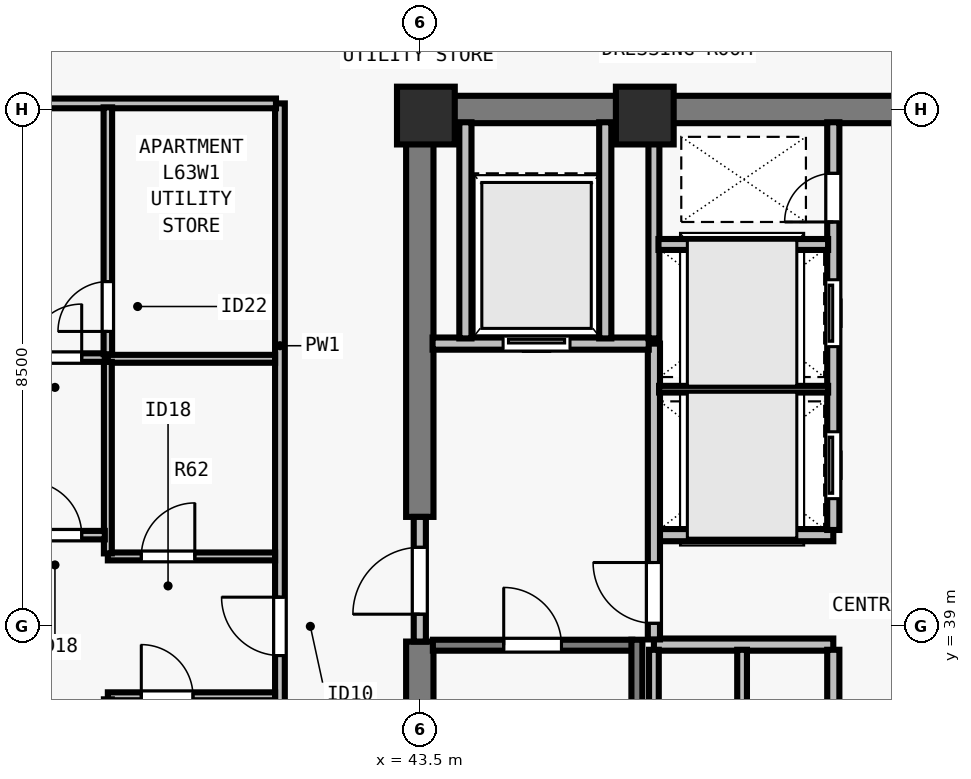
"""IFC4 building model, lengths in metres.
Left out: names, types, materials, properties, quantities, classifications, styles, units other than length and angle.
Written with IfcOpenShell. Run it as: python <this file> out.ifc"""

import sys

from ifc_helpers import new_model, si_unit, direction, frame, frame_2d, origin, origin_2d, place, context, subcontext, project, spatial, rectangle, extrude, element, fill, save


model = new_model("IFC4")
c1 = context("Model", 3, precision=1e-05, world=origin(), true_north=direction((0.0, 1.0)))
c2 = subcontext(c1, "Body", "Model", "MODEL_VIEW")
j1 = project(units=[si_unit("LENGTHUNIT", "METRE"), si_unit("PLANEANGLEUNIT", "RADIAN")], contexts=[c1])
p1 = place(None, origin())
s1 = spatial("IfcSite", under=j1, at=p1, CompositionType="ELEMENT")
p2 = place(p1, origin())
s2 = spatial("IfcBuilding", under=s1, at=p2, CompositionType="ELEMENT")
p3 = place(p2, frame((0.0, 0.0, 230.5)))
s3 = spatial("IfcBuildingStorey", under=s2, at=p3, CompositionType="ELEMENT", Elevation=230.5)
for number, where, z_axis, x_axis in (
    (1, (43.6, 47.4, 0.0), (0.0, 0.0, 1.0), (1.0, 0.0, 0.0)),
    (2, (47.2, 47.4, 0.0), (0.0, 0.0, 1.0), (1.0, 0.0, 0.0)),
):
    element("IfcColumn", number, at=place(p3, frame(where, z_axis=z_axis, x_axis=x_axis)), inside=s3, PredefinedType="COLUMN", context=c2, shape_type="SweptSolid", body=[
        extrude(rectangle(XDim=0.95, YDim=0.95, at=origin_2d()), origin(), (0.0, 0.0, 1.0), 3.5),
    ])
p4 = place(p3, frame((43.275, 47.5, 0.0), z_axis=(0.0, 0.0, 1.0), x_axis=(1.0, 0.0, 0.0)))
e3 = element("IfcWall", 3, at=p4, inside=s3, PredefinedType="SHEAR", context=c2, shape_type="SweptSolid", body=[
    extrude(rectangle(XDim=17.45, YDim=0.45, at=frame_2d((8.725, 0.0))), origin(), (0.0, 0.0, 1.0), 3.29),
])
p5 = place(p3, frame((43.5, 30.715, 0.0), z_axis=(0.0, 0.0, 1.0), x_axis=(0.0, 1.0, 0.0)))
e4 = element("IfcWall", 4, at=p5, inside=s3, PredefinedType="SHEAR", context=c2, shape_type="SweptSolid", body=[
    extrude(rectangle(XDim=8.035, YDim=0.45, at=frame_2d((4.018, 0.0))), origin(), (0.0, 0.0, 1.0), 3.29),
])
p6 = place(p3, frame((43.5, 40.8, 0.0), z_axis=(0.0, 0.0, 1.0), x_axis=(0.0, 1.0, 0.0)))
e5 = element("IfcWall", 5, at=p6, inside=s3, PredefinedType="SHEAR", context=c2, shape_type="SweptSolid", body=[
    extrude(rectangle(XDim=6.485, YDim=0.45, at=frame_2d((3.242, 0.0))), origin(), (0.0, 0.0, 1.0), 3.29),
])
for number, where, z_axis, x_axis in (
    (6, (47.35, 38.7, 0.0), (0.0, 0.0, 1.0), (1.0, 0.0, 0.0)),
    (7, (47.35, 40.5, 0.0), (0.0, 0.0, 1.0), (1.0, 0.0, 0.0)),
):
    element("IfcWall", number, at=place(p3, frame(where, z_axis=z_axis, x_axis=x_axis)), inside=s3, PredefinedType="SOLIDWALL", context=c2, shape_type="SweptSolid", body=[
        extrude(rectangle(XDim=2.95, YDim=0.2, at=frame_2d((1.475, 0.0))), origin(), (0.0, 0.0, 1.0), 3.29),
    ])
p7 = place(p3, frame((50.3, 30.71, 0.0), z_axis=(0.0, 0.0, 1.0), x_axis=(0.0, 1.0, 0.0)))
e8 = element("IfcWall", 8, at=p7, inside=s3, PredefinedType="SOLIDWALL", context=c2, shape_type="SweptSolid", body=[
    extrude(rectangle(XDim=7.905, YDim=0.2, at=frame_2d((3.953, 0.0))), origin(), (0.0, 0.0, 1.0), 3.29),
])
p8 = place(p7, frame((2.14, 0.0, 0.0)))
e9 = element("IfcOpeningElement", 9, at=p8, cuts=e8, PredefinedType="OPENING", context=c2, shape_type="SweptSolid", body=[
    extrude(rectangle(XDim=0.95, YDim=2.12, at=frame_2d((0.475, 1.06))), frame((0.0, 0.11, 0.0), z_axis=(0.0, -1.0, 0.0), x_axis=(1.0, 0.0, 0.0)), (0.0, 0.0, 1.0), 0.22),
])
p9 = place(p3, frame((50.3, 40.585, 0.0), z_axis=(0.0, 0.0, 1.0), x_axis=(0.0, 1.0, 0.0)))
e10 = element("IfcWall", 10, at=p9, inside=s3, PredefinedType="SOLIDWALL", context=c2, shape_type="SweptSolid", body=[
    extrude(rectangle(XDim=6.705, YDim=0.2, at=frame_2d((3.353, 0.0))), origin(), (0.0, 0.0, 1.0), 3.29),
])
p10 = place(p9, frame((0.515, 0.0, 0.0)))
e11 = element("IfcOpeningElement", 11, at=p10, cuts=e10, PredefinedType="OPENING", context=c2, shape_type="SweptSolid", body=[
    extrude(rectangle(XDim=1.1, YDim=2.2, at=frame_2d((0.55, 1.1))), frame((0.0, 0.11, 0.0), z_axis=(0.0, -1.0, 0.0), x_axis=(1.0, 0.0, 0.0)), (0.0, 0.0, 1.0), 0.22),
])
p11 = place(p9, frame((3.015, 0.0, 0.0)))
e12 = element("IfcOpeningElement", 12, at=p11, cuts=e10, PredefinedType="OPENING", context=c2, shape_type="SweptSolid", body=[
    extrude(rectangle(XDim=1.1, YDim=2.2, at=frame_2d((0.55, 1.1))), frame((0.0, 0.11, 0.0), z_axis=(0.0, -1.0, 0.0), x_axis=(1.0, 0.0, 0.0)), (0.0, 0.0, 1.0), 0.22),
])
p12 = place(p9, frame((5.065, 0.0, 0.0)))
e13 = element("IfcOpeningElement", 13, at=p12, cuts=e10, PredefinedType="OPENING", context=c2, shape_type="SweptSolid", body=[
    extrude(rectangle(XDim=0.8, YDim=2.08, at=frame_2d((0.4, 1.04))), frame((0.0, 0.11, 0.0), z_axis=(0.0, -1.0, 0.0), x_axis=(1.0, 0.0, 0.0)), (0.0, 0.0, 1.0), 0.22),
])
p13 = place(p3, frame((43.5, 38.75, 0.0), z_axis=(0.0, 0.0, 1.0), x_axis=(0.0, 1.0, 0.0)))
e14 = element("IfcWall", 14, at=p13, inside=s3, PredefinedType="SOLIDWALL", context=c2, shape_type="SweptSolid", body=[
    extrude(rectangle(XDim=2.05, YDim=0.2, at=frame_2d((1.025, 0.0))), origin(), (0.0, 0.0, 1.0), 3.29),
])
p14 = place(p13, frame((0.45, 0.0, 0.0)))
e15 = element("IfcOpeningElement", 15, at=p14, cuts=e14, PredefinedType="OPENING", context=c2, shape_type="SweptSolid", body=[
    extrude(rectangle(XDim=1.1, YDim=2.15, at=frame_2d((0.55, 1.075))), frame((0.0, 0.11, 0.0), z_axis=(0.0, -1.0, 0.0), x_axis=(1.0, 0.0, 0.0)), (0.0, 0.0, 1.0), 0.22),
])
p15 = place(p3, frame((47.35, 38.785, 0.0), z_axis=(0.0, 0.0, 1.0), x_axis=(0.0, 1.0, 0.0)))
e16 = element("IfcWall", 16, at=p15, inside=s3, PredefinedType="SOLIDWALL", context=c2, shape_type="SweptSolid", body=[
    extrude(rectangle(XDim=4.865, YDim=0.2, at=frame_2d((2.433, 0.0))), origin(), (0.0, 0.0, 1.0), 3.29),
])
p16 = place(p15, frame((0.265, 0.0, 0.0)))
e17 = element("IfcOpeningElement", 17, at=p16, cuts=e16, PredefinedType="OPENING", context=c2, shape_type="SweptSolid", body=[
    extrude(rectangle(XDim=1.0, YDim=2.15, at=frame_2d((0.5, 1.075))), frame((0.0, 0.11, 0.0), z_axis=(0.0, -1.0, 0.0), x_axis=(1.0, 0.0, 0.0)), (0.0, 0.0, 1.0), 0.22),
])
p17 = place(p3, frame((43.71, 43.65, 0.0), z_axis=(0.0, 0.0, 1.0), x_axis=(1.0, 0.0, 0.0)))
e18 = element("IfcWall", 18, at=p17, inside=s3, PredefinedType="SOLIDWALL", context=c2, shape_type="SweptSolid", body=[
    extrude(rectangle(XDim=3.555, YDim=0.2, at=frame_2d((1.777, 0.0))), origin(), (0.0, 0.0, 1.0), 3.29),
])
p18 = place(p17, frame((1.16, 0.0, 0.0)))
e19 = element("IfcOpeningElement", 19, at=p18, cuts=e18, PredefinedType="OPENING", context=c2, shape_type="SweptSolid", body=[
    extrude(rectangle(XDim=1.1, YDim=2.2, at=frame_2d((0.55, 1.1))), frame((0.0, 0.11, 0.0), z_axis=(0.0, -1.0, 0.0), x_axis=(1.0, 0.0, 0.0)), (0.0, 0.0, 1.0), 0.22),
])
for number, where, z_axis, x_axis in (
    (20, (46.55, 43.735, 0.0), (0.0, 0.0, 1.0), (0.0, 1.0, 0.0)),
    (21, (44.25, 43.735, 0.0), (0.0, 0.0, 1.0), (0.0, 1.0, 0.0)),
):
    element("IfcWall", number, at=place(p3, frame(where, z_axis=z_axis, x_axis=x_axis)), inside=s3, PredefinedType="SOLIDWALL", context=c2, shape_type="SweptSolid", body=[
        extrude(rectangle(XDim=3.555, YDim=0.2, at=frame_2d((1.777, 0.0))), origin(), (0.0, 0.0, 1.0), 3.29),
    ])
p19 = place(p3, frame((47.35, 30.71, 0.0), z_axis=(0.0, 0.0, 1.0), x_axis=(0.0, 1.0, 0.0)))
e22 = element("IfcWall", 22, at=p19, inside=s3, PredefinedType="PARTITIONING", context=c2, shape_type="SweptSolid", body=[
    extrude(rectangle(XDim=7.905, YDim=0.16, at=frame_2d((3.953, 0.0))), origin(), (0.0, 0.0, 1.0), 3.29),
])
p20 = place(p3, frame((48.8, 30.71, 0.0), z_axis=(0.0, 0.0, 1.0), x_axis=(0.0, 1.0, 0.0)))
e23 = element("IfcWall", 23, at=p20, inside=s3, PredefinedType="PARTITIONING", context=c2, shape_type="SweptSolid", body=[
    extrude(rectangle(XDim=7.905, YDim=0.16, at=frame_2d((3.953, 0.0))), origin(), (0.0, 0.0, 1.0), 3.29),
])
p21 = place(p20, frame((3.54, 0.0, 0.0)))
e24 = element("IfcOpeningElement", 24, at=p21, cuts=e23, PredefinedType="OPENING", context=c2, shape_type="SweptSolid", body=[
    extrude(rectangle(XDim=0.85, YDim=2.12, at=frame_2d((0.425, 1.06))), frame((0.0, 0.09, 0.0), z_axis=(0.0, -1.0, 0.0), x_axis=(1.0, 0.0, 0.0)), (0.0, 0.0, 1.0), 0.18),
])
p22 = place(p3, frame((47.35, 43.735, 0.0), z_axis=(0.0, 0.0, 1.0), x_axis=(0.0, 1.0, 0.0)))
e25 = element("IfcWall", 25, at=p22, inside=s3, PredefinedType="SOLIDWALL", context=c2, shape_type="SweptSolid", body=[
    extrude(rectangle(XDim=3.555, YDim=0.18, at=frame_2d((1.777, 0.0))), origin(), (0.0, 0.0, 1.0), 3.29),
])
p23 = place(p3, frame((47.435, 42.9, 0.0), z_axis=(0.0, 0.0, 1.0), x_axis=(1.0, 0.0, 0.0)))
e26 = element("IfcWall", 26, at=p23, inside=s3, PredefinedType="PARTITIONING", context=c2, shape_type="SweptSolid", body=[
    extrude(rectangle(XDim=2.78, YDim=0.11, at=frame_2d((1.39, 0.0))), origin(), (0.0, 0.0, 1.0), 3.29),
])
p24 = place(p3, frame((47.425, 45.28, 0.0), z_axis=(0.0, 0.0, 1.0), x_axis=(1.0, 0.0, 0.0)))
e27 = element("IfcWall", 27, at=p24, inside=s3, PredefinedType="SOLIDWALL", context=c2, shape_type="SweptSolid", body=[
    extrude(rectangle(XDim=2.79, YDim=0.18, at=frame_2d((1.395, 0.0))), origin(), (0.0, 0.0, 1.0), 3.29),
])
p25 = place(p3, frame((41.2, 30.4, 0.0), z_axis=(0.0, 0.0, 1.0), x_axis=(0.0, 1.0, 0.0)))
e28 = element("IfcWall", 28, at=p25, inside=s3, PredefinedType="PARTITIONING", context=c2, shape_type="SweptSolid", body=[
    extrude(rectangle(XDim=17.2, YDim=0.16, at=frame_2d((8.6, 0.0))), origin(), (0.0, 0.0, 1.0), 3.29),
])
p26 = place(p25, frame((8.12, 0.0, 0.0)))
e29 = element("IfcOpeningElement", 29, at=p26, cuts=e28, PredefinedType="OPENING", context=c2, shape_type="SweptSolid", body=[
    extrude(rectangle(XDim=0.96, YDim=2.18, at=frame_2d((0.48, 1.09))), frame((0.0, 0.09, 0.0), z_axis=(0.0, -1.0, 0.0), x_axis=(1.0, 0.0, 0.0)), (0.0, 0.0, 1.0), 0.18),
])
p27 = place(p3, frame((29.77, 47.6, 0.0), z_axis=(0.0, 0.0, 1.0), x_axis=(1.0, 0.0, 0.0)))
e30 = element("IfcWall", 30, at=p27, inside=s3, PredefinedType="PARTITIONING", context=c2, shape_type="SweptSolid", body=[
    extrude(rectangle(XDim=11.365, YDim=0.16, at=frame_2d((5.683, 0.0))), origin(), (0.0, 0.0, 1.0), 3.29),
])
p28 = place(p3, frame((38.37, 37.85, 0.0), z_axis=(0.0, 0.0, 1.0), x_axis=(1.0, 0.0, 0.0)))
e31 = element("IfcWall", 31, at=p28, inside=s3, PredefinedType="PLUMBINGWALL", context=c2, shape_type="SweptSolid", body=[
    extrude(rectangle(XDim=2.75, YDim=0.13, at=frame_2d((1.375, 0.0))), origin(), (0.0, 0.0, 1.0), 3.29),
])
p29 = place(p28, frame((0.55, 0.0, 0.0)))
e32 = element("IfcOpeningElement", 32, at=p29, cuts=e31, PredefinedType="OPENING", context=c2, shape_type="SweptSolid", body=[
    extrude(rectangle(XDim=0.85, YDim=2.08, at=frame_2d((0.425, 1.04))), frame((0.0, 0.075, 0.0), z_axis=(0.0, -1.0, 0.0), x_axis=(1.0, 0.0, 0.0)), (0.0, 0.0, 1.0), 0.15),
])
p30 = place(p3, frame((38.37, 43.4, 0.0), z_axis=(0.0, 0.0, 1.0), x_axis=(1.0, 0.0, 0.0)))
e33 = element("IfcWall", 33, at=p30, inside=s3, PredefinedType="PLUMBINGWALL", context=c2, shape_type="SweptSolid", body=[
    extrude(rectangle(XDim=2.75, YDim=0.13, at=frame_2d((1.375, 0.0))), origin(), (0.0, 0.0, 1.0), 2.958),
])
p31 = place(p3, frame((38.37, 40.15, 0.0), z_axis=(0.0, 0.0, 1.0), x_axis=(1.0, 0.0, 0.0)))
e34 = element("IfcWall", 34, at=p31, inside=s3, PredefinedType="PLUMBINGWALL", context=c2, shape_type="SweptSolid", body=[
    extrude(rectangle(XDim=2.75, YDim=0.13, at=frame_2d((1.375, 0.0))), origin(), (0.0, 0.0, 1.0), 3.29),
])
p32 = place(p31, frame((0.55, 0.0, 0.0)))
e35 = element("IfcOpeningElement", 35, at=p32, cuts=e34, PredefinedType="OPENING", context=c2, shape_type="SweptSolid", body=[
    extrude(rectangle(XDim=0.88, YDim=2.1, at=frame_2d((0.44, 1.05))), frame((0.0, 0.075, 0.0), z_axis=(0.0, -1.0, 0.0), x_axis=(1.0, 0.0, 0.0)), (0.0, 0.0, 1.0), 0.15),
])
p33 = place(p3, frame((38.37, 40.2, 0.0), z_axis=(0.0, 0.0, 1.0), x_axis=(0.0, 1.0, 0.0)))
e36 = element("IfcWall", 36, at=p33, inside=s3, PredefinedType="PLUMBINGWALL", context=c2, shape_type="SweptSolid", body=[
    extrude(rectangle(XDim=3.15, YDim=0.13, at=frame_2d((1.575, 0.0))), origin(), (0.0, 0.0, 1.0), 3.29),
])
p34 = place(p3, frame((29.88, 43.42, 0.0), z_axis=(0.0, 0.0, 1.0), x_axis=(1.0, 0.0, 0.0)))
e37 = element("IfcWall", 37, at=p34, inside=s3, PredefinedType="PARTITIONING", context=c2, shape_type="SweptSolid", body=[
    extrude(rectangle(XDim=8.44, YDim=0.14, at=frame_2d((4.22, 0.0))), origin(), (0.0, 0.0, 1.0), 3.29),
])
p35 = place(p34, frame((7.18, 0.0, 0.0)))
e38 = element("IfcOpeningElement", 38, at=p35, cuts=e37, PredefinedType="OPENING", context=c2, shape_type="SweptSolid", body=[
    extrude(rectangle(XDim=0.88, YDim=2.1, at=frame_2d((0.44, 1.05))), frame((0.0, 0.08, 0.0), z_axis=(0.0, -1.0, 0.0), x_axis=(1.0, 0.0, 0.0)), (0.0, 0.0, 1.0), 0.16),
])
p36 = place(p3, frame((38.37, 43.475, 0.0), z_axis=(0.0, 0.0, 1.0), x_axis=(0.0, 1.0, 0.0)))
e39 = element("IfcWall", 39, at=p36, inside=s3, PredefinedType="PARTITIONING", context=c2, shape_type="SweptSolid", body=[
    extrude(rectangle(XDim=4.06, YDim=0.14, at=frame_2d((2.03, 0.0))), origin(), (0.0, 0.0, 1.0), 3.29),
])
p37 = place(p36, frame((0.375, 0.0, 0.0)))
e40 = element("IfcOpeningElement", 40, at=p37, cuts=e39, PredefinedType="OPENING", context=c2, shape_type="SweptSolid", body=[
    extrude(rectangle(XDim=0.82, YDim=2.1, at=frame_2d((0.41, 1.05))), frame((0.0, 0.08, 0.0), z_axis=(0.0, -1.0, 0.0), x_axis=(1.0, 0.0, 0.0)), (0.0, 0.0, 1.0), 0.16),
])
p38 = place(p3, frame((29.88, 40.5, 0.0), z_axis=(0.0, 0.0, 1.0), x_axis=(1.0, 0.0, 0.0)))
e41 = element("IfcWall", 41, at=p38, inside=s3, PredefinedType="PARTITIONING", context=c2, shape_type="SweptSolid", body=[
    extrude(rectangle(XDim=8.44, YDim=0.14, at=frame_2d((4.22, 0.0))), origin(), (0.0, 0.0, 1.0), 2.958),
])
p39 = place(p38, frame((7.18, 0.0, 0.0)))
e42 = element("IfcOpeningElement", 42, at=p39, cuts=e41, PredefinedType="OPENING", context=c2, shape_type="SweptSolid", body=[
    extrude(rectangle(XDim=0.88, YDim=2.1, at=frame_2d((0.44, 1.05))), frame((0.0, 0.08, 0.0), z_axis=(0.0, -1.0, 0.0), x_axis=(1.0, 0.0, 0.0)), (0.0, 0.0, 1.0), 0.16),
])
p40 = place(p3, frame((43.715, 38.69, 0.0), z_axis=(0.0, 0.0, 1.0), x_axis=(1.0, 0.0, 0.0)))
e43 = element("IfcWall", 43, at=p40, inside=s3, PredefinedType="SOLIDWALL", context=c2, shape_type="SweptSolid", body=[
    extrude(rectangle(XDim=3.28, YDim=0.18, at=frame_2d((1.64, 0.0))), origin(), (0.0, 0.0, 1.0), 3.29),
])
p41 = place(p40, frame((1.165, 0.0, 0.0)))
e44 = element("IfcOpeningElement", 44, at=p41, cuts=e43, PredefinedType="OPENING", context=c2, shape_type="SweptSolid", body=[
    extrude(rectangle(XDim=0.95, YDim=2.15, at=frame_2d((0.475, 1.075))), frame((0.0, 0.1, 0.0), z_axis=(0.0, -1.0, 0.0), x_axis=(1.0, 0.0, 0.0)), (0.0, 0.0, 1.0), 0.2),
])
p42 = place(p3, frame((47.07, 38.78, 0.0), z_axis=(0.0, 0.0, 1.0), x_axis=(0.0, -1.0, 0.0)))
e45 = element("IfcWall", 45, at=p42, inside=s3, PredefinedType="SOLIDWALL", context=c2, shape_type="SweptSolid", body=[
    extrude(rectangle(XDim=8.067, YDim=0.18, at=frame_2d((4.034, 0.0))), origin(), (0.0, 0.0, 1.0), 3.29),
])
p43 = place(p14, origin())
e46 = element("IfcDoor", 46, at=p43, inside=s3, OperationType="SINGLE_SWING_LEFT", PredefinedType="DOOR", context=c2, shape_type="SweptSolid", body=[
    extrude(rectangle(XDim=1.1, YDim=2.15, at=frame_2d((0.55, 1.075))), frame((0.0, 0.025, 0.0), z_axis=(0.0, -1.0, 0.0), x_axis=(1.0, 0.0, 0.0)), (0.0, 0.0, 1.0), 0.05),
])
fill(e15, e46)
p44 = place(p16, origin())
e47 = element("IfcDoor", 47, at=p44, inside=s3, OperationType="SINGLE_SWING_RIGHT", PredefinedType="DOOR", context=c2, shape_type="SweptSolid", body=[
    extrude(rectangle(XDim=1.0, YDim=2.15, at=frame_2d((0.5, 1.075))), frame((0.0, 0.025, 0.0), z_axis=(0.0, -1.0, 0.0), x_axis=(1.0, 0.0, 0.0)), (0.0, 0.0, 1.0), 0.05),
])
fill(e17, e47)
p45 = place(p18, origin())
e48 = element("IfcDoor", 48, at=p45, inside=s3, OperationType="SLIDING_TO_LEFT", PredefinedType="DOOR", context=c2, shape_type="SweptSolid", body=[
    extrude(rectangle(XDim=1.1, YDim=2.2, at=frame_2d((0.55, 1.1))), frame((0.0, 0.025, 0.0), z_axis=(0.0, -1.0, 0.0), x_axis=(1.0, 0.0, 0.0)), (0.0, 0.0, 1.0), 0.05),
])
fill(e19, e48)
p46 = place(p10, origin())
e49 = element("IfcDoor", 49, at=p46, inside=s3, OperationType="SLIDING_TO_LEFT", PredefinedType="DOOR", context=c2, shape_type="SweptSolid", body=[
    extrude(rectangle(XDim=1.1, YDim=2.2, at=frame_2d((0.55, 1.1))), frame((0.0, 0.025, 0.0), z_axis=(0.0, -1.0, 0.0), x_axis=(1.0, 0.0, 0.0)), (0.0, 0.0, 1.0), 0.05),
])
fill(e11, e49)
p47 = place(p11, origin())
e50 = element("IfcDoor", 50, at=p47, inside=s3, OperationType="SLIDING_TO_LEFT", PredefinedType="DOOR", context=c2, shape_type="SweptSolid", body=[
    extrude(rectangle(XDim=1.1, YDim=2.2, at=frame_2d((0.55, 1.1))), frame((0.0, 0.025, 0.0), z_axis=(0.0, -1.0, 0.0), x_axis=(1.0, 0.0, 0.0)), (0.0, 0.0, 1.0), 0.05),
])
fill(e12, e50)
p48 = place(p12, origin())
e51 = element("IfcDoor", 51, at=p48, inside=s3, OperationType="SINGLE_SWING_LEFT", PredefinedType="DOOR", context=c2, shape_type="SweptSolid", body=[
    extrude(rectangle(XDim=0.8, YDim=2.08, at=frame_2d((0.4, 1.04))), frame((0.0, 0.025, 0.0), z_axis=(0.0, -1.0, 0.0), x_axis=(1.0, 0.0, 0.0)), (0.0, 0.0, 1.0), 0.05),
])
fill(e13, e51)
p49 = place(p29, origin())
e52 = element("IfcDoor", 52, at=p49, inside=s3, OperationType="SINGLE_SWING_LEFT", PredefinedType="DOOR", context=c2, shape_type="SweptSolid", body=[
    extrude(rectangle(XDim=0.85, YDim=2.08, at=frame_2d((0.425, 1.04))), frame((0.0, 0.025, 0.0), z_axis=(0.0, -1.0, 0.0), x_axis=(1.0, 0.0, 0.0)), (0.0, 0.0, 1.0), 0.05),
])
fill(e32, e52)
p50 = place(p32, origin())
e53 = element("IfcDoor", 53, at=p50, inside=s3, OperationType="SINGLE_SWING_RIGHT", PredefinedType="DOOR", context=c2, shape_type="SweptSolid", body=[
    extrude(rectangle(XDim=0.88, YDim=2.1, at=frame_2d((0.44, 1.05))), frame((0.0, 0.025, 0.0), z_axis=(0.0, -1.0, 0.0), x_axis=(1.0, 0.0, 0.0)), (0.0, 0.0, 1.0), 0.05),
])
fill(e35, e53)
p51 = place(p37, origin())
e54 = element("IfcDoor", 54, at=p51, inside=s3, OperationType="SINGLE_SWING_LEFT", PredefinedType="DOOR", context=c2, shape_type="SweptSolid", body=[
    extrude(rectangle(XDim=0.82, YDim=2.1, at=frame_2d((0.41, 1.05))), frame((0.0, 0.025, 0.0), z_axis=(0.0, -1.0, 0.0), x_axis=(1.0, 0.0, 0.0)), (0.0, 0.0, 1.0), 0.05),
])
fill(e40, e54)
p52 = place(p35, origin())
e55 = element("IfcDoor", 55, at=p52, inside=s3, OperationType="SINGLE_SWING_RIGHT", PredefinedType="DOOR", context=c2, shape_type="SweptSolid", body=[
    extrude(rectangle(XDim=0.88, YDim=2.1, at=frame_2d((0.44, 1.05))), frame((0.0, 0.025, 0.0), z_axis=(0.0, -1.0, 0.0), x_axis=(1.0, 0.0, 0.0)), (0.0, 0.0, 1.0), 0.05),
])
fill(e38, e55)
p53 = place(p39, origin())
e56 = element("IfcDoor", 56, at=p53, inside=s3, OperationType="SINGLE_SWING_LEFT", PredefinedType="DOOR", context=c2, shape_type="SweptSolid", body=[
    extrude(rectangle(XDim=0.88, YDim=2.1, at=frame_2d((0.44, 1.05))), frame((0.0, 0.025, 0.0), z_axis=(0.0, -1.0, 0.0), x_axis=(1.0, 0.0, 0.0)), (0.0, 0.0, 1.0), 0.05),
])
fill(e42, e56)
p54 = place(p26, origin())
e57 = element("IfcDoor", 57, at=p54, inside=s3, OperationType="SINGLE_SWING_RIGHT", PredefinedType="DOOR", context=c2, shape_type="SweptSolid", body=[
    extrude(rectangle(XDim=0.96, YDim=2.18, at=frame_2d((0.48, 1.09))), frame((0.0, 0.025, 0.0), z_axis=(0.0, -1.0, 0.0), x_axis=(1.0, 0.0, 0.0)), (0.0, 0.0, 1.0), 0.05),
])
fill(e29, e57)
p55 = place(p41, origin())
e58 = element("IfcDoor", 58, at=p55, inside=s3, OperationType="SINGLE_SWING_LEFT", PredefinedType="DOOR", context=c2, shape_type="SweptSolid", body=[
    extrude(rectangle(XDim=0.95, YDim=2.15, at=frame_2d((0.475, 1.075))), frame((0.0, 0.025, 0.0), z_axis=(0.0, -1.0, 0.0), x_axis=(1.0, 0.0, 0.0)), (0.0, 0.0, 1.0), 0.05),
])
fill(e44, e58)
save(model, sys.argv[1])
